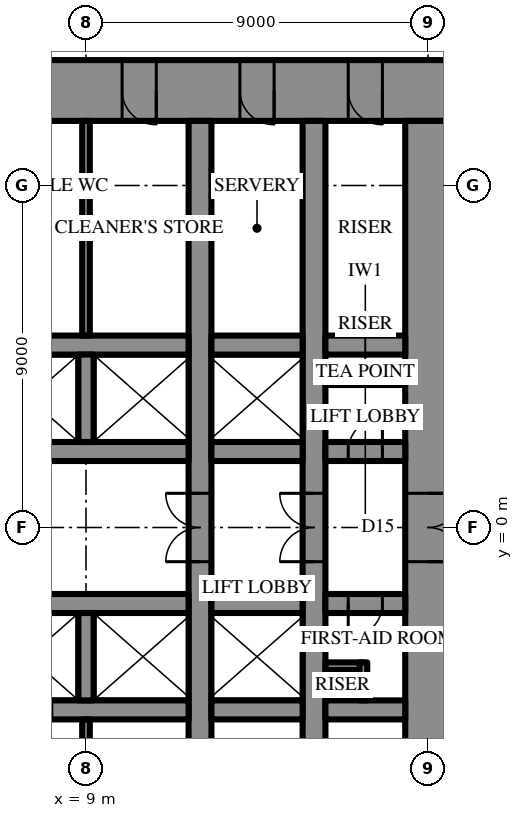
"""IFC4 building model, lengths in metres.
Left out: names, types, materials, properties, quantities, classifications, styles, units other than length and angle.
Written with IfcOpenShell. Run it as: python <this file> out.ifc"""

import sys

from ifc_helpers import new_model, si_unit, direction, frame, frame_2d, origin, place, context, subcontext, project, spatial, rectangle, extrude, element, fill, save


model = new_model("IFC4")
c1 = context("Model", 3, precision=1e-05, world=origin(), true_north=direction((0.0, 1.0)))
c2 = subcontext(c1, "Body", "Model", "MODEL_VIEW")
j1 = project(units=[si_unit("LENGTHUNIT", "METRE"), si_unit("PLANEANGLEUNIT", "RADIAN")], contexts=[c1])
p1 = place(None, origin())
s1 = spatial("IfcSite", under=j1, at=p1, CompositionType="ELEMENT")
p2 = place(p1, origin())
s2 = spatial("IfcBuilding", under=s1, at=p2, CompositionType="ELEMENT")
p3 = place(p2, frame((0.0, 0.0, 148.9)))
s3 = spatial("IfcBuildingStorey", under=s2, at=p3, CompositionType="ELEMENT", Elevation=148.9)
p4 = place(p3, frame((-18.6, 11.5, 0.0), z_axis=(0.0, 0.0, 1.0), x_axis=(1.0, 0.0, 0.0)))
e1 = element("IfcWall", 1, at=p4, inside=s3, PredefinedType="SHEAR", context=c2, shape_type="SweptSolid", body=[
    extrude(rectangle(XDim=37.2, YDim=1.6, at=frame_2d((18.6, 0.0))), origin(), (0.0, 0.0, 1.0), 4.2),
])
p5 = place(p4, frame((19.45, 0.0, 0.0)))
e2 = element("IfcOpeningElement", 2, at=p5, cuts=e1, PredefinedType="OPENING", context=c2, shape_type="SweptSolid", body=[
    extrude(rectangle(XDim=0.9, YDim=2.2, at=frame_2d((0.45, 1.1))), frame((0.0, 0.81, 0.0), z_axis=(0.0, -1.0, 0.0), x_axis=(1.0, 0.0, 0.0)), (0.0, 0.0, 1.0), 1.62),
])
p6 = place(p4, frame((22.45, 0.0, 0.0)))
e3 = element("IfcOpeningElement", 3, at=p6, cuts=e1, PredefinedType="OPENING", context=c2, shape_type="SweptSolid", body=[
    extrude(rectangle(XDim=0.9, YDim=2.2, at=frame_2d((0.45, 1.1))), frame((0.0, 0.81, 0.0), z_axis=(0.0, -1.0, 0.0), x_axis=(1.0, 0.0, 0.0)), (0.0, 0.0, 1.0), 1.62),
])
p7 = place(p4, frame((25.5, 0.0, 0.0)))
e4 = element("IfcOpeningElement", 4, at=p7, cuts=e1, PredefinedType="OPENING", context=c2, shape_type="SweptSolid", body=[
    extrude(rectangle(XDim=1.0, YDim=2.2, at=frame_2d((0.5, 1.1))), frame((0.0, 0.81, 0.0), z_axis=(0.0, -1.0, 0.0), x_axis=(1.0, 0.0, 0.0)), (0.0, 0.0, 1.0), 1.62),
])
p8 = place(p4, frame((1.8, 0.0, 0.0)))
e5 = element("IfcOpeningElement", 5, at=p8, cuts=e1, PredefinedType="OPENING", context=c2, shape_type="SweptSolid", body=[
    extrude(rectangle(XDim=0.9, YDim=2.2, at=frame_2d((0.45, 1.1))), frame((0.0, 0.81, 0.0), z_axis=(0.0, -1.0, 0.0), x_axis=(1.0, 0.0, 0.0)), (0.0, 0.0, 1.0), 1.62),
])
p9 = place(p4, frame((4.65, 0.0, 0.0)))
e6 = element("IfcOpeningElement", 6, at=p9, cuts=e1, PredefinedType="OPENING", context=c2, shape_type="SweptSolid", body=[
    extrude(rectangle(XDim=0.9, YDim=2.2, at=frame_2d((0.45, 1.1))), frame((0.0, 0.81, 0.0), z_axis=(0.0, -1.0, 0.0), x_axis=(1.0, 0.0, 0.0)), (0.0, 0.0, 1.0), 1.62),
])
p10 = place(p4, frame((7.75, 0.0, 0.0)))
e7 = element("IfcOpeningElement", 7, at=p10, cuts=e1, PredefinedType="OPENING", context=c2, shape_type="SweptSolid", body=[
    extrude(rectangle(XDim=0.9, YDim=2.2, at=frame_2d((0.45, 1.1))), frame((0.0, 0.81, 0.0), z_axis=(0.0, -1.0, 0.0), x_axis=(1.0, 0.0, 0.0)), (0.0, 0.0, 1.0), 1.62),
])
p11 = place(p4, frame((28.55, 0.0, 0.0)))
e8 = element("IfcOpeningElement", 8, at=p11, cuts=e1, PredefinedType="OPENING", context=c2, shape_type="SweptSolid", body=[
    extrude(rectangle(XDim=0.9, YDim=2.2, at=frame_2d((0.45, 1.1))), frame((0.0, 0.81, 0.0), z_axis=(0.0, -1.0, 0.0), x_axis=(1.0, 0.0, 0.0)), (0.0, 0.0, 1.0), 1.62),
])
p12 = place(p4, frame((31.65, 0.0, 0.0)))
e9 = element("IfcOpeningElement", 9, at=p12, cuts=e1, PredefinedType="OPENING", context=c2, shape_type="SweptSolid", body=[
    extrude(rectangle(XDim=0.9, YDim=2.2, at=frame_2d((0.45, 1.1))), frame((0.0, 0.81, 0.0), z_axis=(0.0, -1.0, 0.0), x_axis=(1.0, 0.0, 0.0)), (0.0, 0.0, 1.0), 1.62),
])
p13 = place(p4, frame((34.5, 0.0, 0.0)))
e10 = element("IfcOpeningElement", 10, at=p13, cuts=e1, PredefinedType="OPENING", context=c2, shape_type="SweptSolid", body=[
    extrude(rectangle(XDim=0.9, YDim=2.2, at=frame_2d((0.45, 1.1))), frame((0.0, 0.81, 0.0), z_axis=(0.0, -1.0, 0.0), x_axis=(1.0, 0.0, 0.0)), (0.0, 0.0, 1.0), 1.62),
])
p14 = place(p3, frame((18.0, -10.7, 0.0), z_axis=(0.0, 0.0, 1.0), x_axis=(0.0, 1.0, 0.0)))
e11 = element("IfcWall", 11, at=p14, inside=s3, PredefinedType="SHEAR", context=c2, shape_type="SweptSolid", body=[
    extrude(rectangle(XDim=21.4, YDim=1.2, at=frame_2d((10.7, 0.0))), origin(), (0.0, 0.0, 1.0), 4.2),
])
p15 = place(p14, frame((9.8, 0.0, 0.0)))
e12 = element("IfcOpeningElement", 12, at=p15, cuts=e11, PredefinedType="OPENING", context=c2, shape_type="SweptSolid", body=[
    extrude(rectangle(XDim=1.8, YDim=2.4, at=frame_2d((0.9, 1.2))), frame((0.0, 0.61, 0.0), z_axis=(0.0, -1.0, 0.0), x_axis=(1.0, 0.0, 0.0)), (0.0, 0.0, 1.0), 1.22),
])
p16 = place(p3, frame((12.0, -10.7, 0.0), z_axis=(0.0, 0.0, 1.0), x_axis=(0.0, 1.0, 0.0)))
e13 = element("IfcWall", 13, at=p16, inside=s3, PredefinedType="SHEAR", context=c2, shape_type="SweptSolid", body=[
    extrude(rectangle(XDim=21.4, YDim=0.6, at=frame_2d((10.7, 0.0))), origin(), (0.0, 0.0, 1.0), 4.2),
])
p17 = place(p16, frame((9.8, 0.0, 0.0)))
e14 = element("IfcOpeningElement", 14, at=p17, cuts=e13, PredefinedType="OPENING", context=c2, shape_type="SweptSolid", body=[
    extrude(rectangle(XDim=1.8, YDim=2.4, at=frame_2d((0.9, 1.2))), frame((0.0, 0.31, 0.0), z_axis=(0.0, -1.0, 0.0), x_axis=(1.0, 0.0, 0.0)), (0.0, 0.0, 1.0), 0.62),
])
p18 = place(p3, frame((15.0, -10.7, 0.0), z_axis=(0.0, 0.0, 1.0), x_axis=(0.0, 1.0, 0.0)))
e15 = element("IfcWall", 15, at=p18, inside=s3, PredefinedType="SHEAR", context=c2, shape_type="SweptSolid", body=[
    extrude(rectangle(XDim=21.4, YDim=0.6, at=frame_2d((10.7, 0.0))), origin(), (0.0, 0.0, 1.0), 4.2),
])
p19 = place(p18, frame((9.8, 0.0, 0.0)))
e16 = element("IfcOpeningElement", 16, at=p19, cuts=e15, PredefinedType="OPENING", context=c2, shape_type="SweptSolid", body=[
    extrude(rectangle(XDim=1.8, YDim=2.4, at=frame_2d((0.9, 1.2))), frame((0.0, 0.31, 0.0), z_axis=(0.0, -1.0, 0.0), x_axis=(1.0, 0.0, 0.0)), (0.0, 0.0, 1.0), 0.62),
])
p20 = place(p3, frame((-3.2, 2.0, 0.0), z_axis=(0.0, 0.0, 1.0), x_axis=(1.0, 0.0, 0.0)))
e17 = element("IfcWall", 17, at=p20, inside=s3, PredefinedType="SHEAR", context=c2, shape_type="SweptSolid", body=[
    extrude(rectangle(XDim=14.9, YDim=0.5, at=frame_2d((7.45, 0.0))), origin(), (0.0, 0.0, 1.0), 4.2),
])
p21 = place(p20, frame((1.15, 0.0, 0.0)))
e18 = element("IfcOpeningElement", 18, at=p21, cuts=e17, PredefinedType="OPENING", context=c2, shape_type="SweptSolid", body=[
    extrude(rectangle(XDim=1.1, YDim=2.2, at=frame_2d((0.55, 1.1))), frame((0.0, 0.26, 0.0), z_axis=(0.0, -1.0, 0.0), x_axis=(1.0, 0.0, 0.0)), (0.0, 0.0, 1.0), 0.52),
])
p22 = place(p20, frame((4.15, 0.0, 0.0)))
e19 = element("IfcOpeningElement", 19, at=p22, cuts=e17, PredefinedType="OPENING", context=c2, shape_type="SweptSolid", body=[
    extrude(rectangle(XDim=1.1, YDim=2.2, at=frame_2d((0.55, 1.1))), frame((0.0, 0.26, 0.0), z_axis=(0.0, -1.0, 0.0), x_axis=(1.0, 0.0, 0.0)), (0.0, 0.0, 1.0), 0.52),
])
p23 = place(p20, frame((7.15, 0.0, 0.0)))
e20 = element("IfcOpeningElement", 20, at=p23, cuts=e17, PredefinedType="OPENING", context=c2, shape_type="SweptSolid", body=[
    extrude(rectangle(XDim=1.1, YDim=2.2, at=frame_2d((0.55, 1.1))), frame((0.0, 0.26, 0.0), z_axis=(0.0, -1.0, 0.0), x_axis=(1.0, 0.0, 0.0)), (0.0, 0.0, 1.0), 0.52),
])
p24 = place(p20, frame((10.15, 0.0, 0.0)))
e21 = element("IfcOpeningElement", 21, at=p24, cuts=e17, PredefinedType="OPENING", context=c2, shape_type="SweptSolid", body=[
    extrude(rectangle(XDim=1.1, YDim=2.2, at=frame_2d((0.55, 1.1))), frame((0.0, 0.26, 0.0), z_axis=(0.0, -1.0, 0.0), x_axis=(1.0, 0.0, 0.0)), (0.0, 0.0, 1.0), 0.52),
])
p25 = place(p3, frame((12.3, 2.0, 0.0), z_axis=(0.0, 0.0, 1.0), x_axis=(1.0, 0.0, 0.0)))
e22 = element("IfcWall", 22, at=p25, inside=s3, PredefinedType="SHEAR", context=c2, shape_type="SweptSolid", body=[
    extrude(rectangle(XDim=2.4, YDim=0.5, at=frame_2d((1.2, 0.0))), origin(), (0.0, 0.0, 1.0), 4.2),
])
p26 = place(p3, frame((15.3, 2.0, 0.0), z_axis=(0.0, 0.0, 1.0), x_axis=(1.0, 0.0, 0.0)))
e23 = element("IfcWall", 23, at=p26, inside=s3, PredefinedType="SHEAR", context=c2, shape_type="SweptSolid", body=[
    extrude(rectangle(XDim=2.1, YDim=0.5, at=frame_2d((1.05, 0.0))), origin(), (0.0, 0.0, 1.0), 4.2),
])
p27 = place(p26, frame((0.6, 0.0, 0.0)))
e24 = element("IfcOpeningElement", 24, at=p27, cuts=e23, PredefinedType="OPENING", context=c2, shape_type="SweptSolid", body=[
    extrude(rectangle(XDim=0.9, YDim=2.2, at=frame_2d((0.45, 1.1))), frame((0.0, 0.26, 0.0), z_axis=(0.0, -1.0, 0.0), x_axis=(1.0, 0.0, 0.0)), (0.0, 0.0, 1.0), 0.52),
])
p28 = place(p3, frame((-11.7, 4.8, 0.0), z_axis=(0.0, 0.0, 1.0), x_axis=(1.0, 0.0, 0.0)))
e25 = element("IfcWall", 25, at=p28, inside=s3, PredefinedType="SHEAR", context=c2, shape_type="SweptSolid", body=[
    extrude(rectangle(XDim=23.4, YDim=0.5, at=frame_2d((11.7, 0.0))), origin(), (0.0, 0.0, 1.0), 4.2),
])
p29 = place(p28, frame((6.6, 0.0, 0.0)))
e26 = element("IfcOpeningElement", 26, at=p29, cuts=e25, PredefinedType="OPENING", context=c2, shape_type="SweptSolid", body=[
    extrude(rectangle(XDim=1.2, YDim=2.2, at=frame_2d((0.6, 1.1))), frame((0.0, 0.26, 0.0), z_axis=(0.0, -1.0, 0.0), x_axis=(1.0, 0.0, 0.0)), (0.0, 0.0, 1.0), 0.52),
])
p30 = place(p28, frame((3.6, 0.0, 0.0)))
e27 = element("IfcOpeningElement", 27, at=p30, cuts=e25, PredefinedType="OPENING", context=c2, shape_type="SweptSolid", body=[
    extrude(rectangle(XDim=1.2, YDim=2.2, at=frame_2d((0.6, 1.1))), frame((0.0, 0.26, 0.0), z_axis=(0.0, -1.0, 0.0), x_axis=(1.0, 0.0, 0.0)), (0.0, 0.0, 1.0), 0.52),
])
p31 = place(p3, frame((12.3, 4.8, 0.0), z_axis=(0.0, 0.0, 1.0), x_axis=(1.0, 0.0, 0.0)))
e28 = element("IfcWall", 28, at=p31, inside=s3, PredefinedType="SHEAR", context=c2, shape_type="SweptSolid", body=[
    extrude(rectangle(XDim=2.4, YDim=0.5, at=frame_2d((1.2, 0.0))), origin(), (0.0, 0.0, 1.0), 4.2),
])
p32 = place(p3, frame((15.3, 4.8, 0.0), z_axis=(0.0, 0.0, 1.0), x_axis=(1.0, 0.0, 0.0)))
e29 = element("IfcWall", 29, at=p32, inside=s3, PredefinedType="SHEAR", context=c2, shape_type="SweptSolid", body=[
    extrude(rectangle(XDim=2.1, YDim=0.5, at=frame_2d((1.05, 0.0))), origin(), (0.0, 0.0, 1.0), 4.2),
])
p33 = place(p3, frame((9.0, 2.25, 0.0), z_axis=(0.0, 0.0, 1.0), x_axis=(0.0, 1.0, 0.0)))
e30 = element("IfcWall", 30, at=p33, inside=s3, PredefinedType="SHEAR", context=c2, shape_type="SweptSolid", body=[
    extrude(rectangle(XDim=2.3, YDim=0.4, at=frame_2d((1.15, 0.0))), origin(), (0.0, 0.0, 1.0), 4.2),
])
p34 = place(p3, frame((17.4, -2.0, 0.0), z_axis=(0.0, 0.0, 1.0), x_axis=(-1.0, 0.0, 0.0)))
e31 = element("IfcWall", 31, at=p34, inside=s3, PredefinedType="SHEAR", context=c2, shape_type="SweptSolid", body=[
    extrude(rectangle(XDim=2.1, YDim=0.5, at=frame_2d((1.05, 0.0))), origin(), (0.0, 0.0, 1.0), 4.2),
])
p35 = place(p34, frame((0.6, 0.0, 0.0)))
e32 = element("IfcOpeningElement", 32, at=p35, cuts=e31, PredefinedType="OPENING", context=c2, shape_type="SweptSolid", body=[
    extrude(rectangle(XDim=0.9, YDim=2.2, at=frame_2d((0.45, 1.1))), frame((0.0, 0.26, 0.0), z_axis=(0.0, -1.0, 0.0), x_axis=(1.0, 0.0, 0.0)), (0.0, 0.0, 1.0), 0.52),
])
p36 = place(p3, frame((14.7, -2.0, 0.0), z_axis=(0.0, 0.0, 1.0), x_axis=(-1.0, 0.0, 0.0)))
e33 = element("IfcWall", 33, at=p36, inside=s3, PredefinedType="SHEAR", context=c2, shape_type="SweptSolid", body=[
    extrude(rectangle(XDim=2.4, YDim=0.5, at=frame_2d((1.2, 0.0))), origin(), (0.0, 0.0, 1.0), 4.2),
])
p37 = place(p3, frame((11.7, -2.0, 0.0), z_axis=(0.0, 0.0, 1.0), x_axis=(-1.0, 0.0, 0.0)))
e34 = element("IfcWall", 34, at=p37, inside=s3, PredefinedType="SHEAR", context=c2, shape_type="SweptSolid", body=[
    extrude(rectangle(XDim=5.9, YDim=0.5, at=frame_2d((2.95, 0.0))), origin(), (0.0, 0.0, 1.0), 4.2),
])
p38 = place(p3, frame((17.4, -4.8, 0.0), z_axis=(0.0, 0.0, 1.0), x_axis=(-1.0, 0.0, 0.0)))
e35 = element("IfcWall", 35, at=p38, inside=s3, PredefinedType="SHEAR", context=c2, shape_type="SweptSolid", body=[
    extrude(rectangle(XDim=2.1, YDim=0.5, at=frame_2d((1.05, 0.0))), origin(), (0.0, 0.0, 1.0), 4.2),
])
p39 = place(p3, frame((14.7, -4.8, 0.0), z_axis=(0.0, 0.0, 1.0), x_axis=(-1.0, 0.0, 0.0)))
e36 = element("IfcWall", 36, at=p39, inside=s3, PredefinedType="SHEAR", context=c2, shape_type="SweptSolid", body=[
    extrude(rectangle(XDim=2.4, YDim=0.5, at=frame_2d((1.2, 0.0))), origin(), (0.0, 0.0, 1.0), 4.2),
])
p40 = place(p3, frame((11.7, -4.8, 0.0), z_axis=(0.0, 0.0, 1.0), x_axis=(-1.0, 0.0, 0.0)))
e37 = element("IfcWall", 37, at=p40, inside=s3, PredefinedType="SHEAR", context=c2, shape_type="SweptSolid", body=[
    extrude(rectangle(XDim=23.4, YDim=0.5, at=frame_2d((11.7, 0.0))), origin(), (0.0, 0.0, 1.0), 4.2),
])
p41 = place(p40, frame((6.6, 0.0, 0.0)))
e38 = element("IfcOpeningElement", 38, at=p41, cuts=e37, PredefinedType="OPENING", context=c2, shape_type="SweptSolid", body=[
    extrude(rectangle(XDim=1.2, YDim=2.2, at=frame_2d((0.6, 1.1))), frame((0.0, 0.26, 0.0), z_axis=(0.0, -1.0, 0.0), x_axis=(1.0, 0.0, 0.0)), (0.0, 0.0, 1.0), 0.52),
])
p42 = place(p40, frame((3.6, 0.0, 0.0)))
e39 = element("IfcOpeningElement", 39, at=p42, cuts=e37, PredefinedType="OPENING", context=c2, shape_type="SweptSolid", body=[
    extrude(rectangle(XDim=1.2, YDim=2.2, at=frame_2d((0.6, 1.1))), frame((0.0, 0.26, 0.0), z_axis=(0.0, -1.0, 0.0), x_axis=(1.0, 0.0, 0.0)), (0.0, 0.0, 1.0), 0.52),
])
p43 = place(p3, frame((9.0, -2.25, 0.0), z_axis=(0.0, 0.0, 1.0), x_axis=(0.0, -1.0, 0.0)))
e40 = element("IfcWall", 40, at=p43, inside=s3, PredefinedType="SHEAR", context=c2, shape_type="SweptSolid", body=[
    extrude(rectangle(XDim=2.3, YDim=0.4, at=frame_2d((1.15, 0.0))), origin(), (0.0, 0.0, 1.0), 4.2),
])
for number, where, z_axis, x_axis in (
    (41, (9.0, 5.05, 0.0), (0.0, 0.0, 1.0), (0.0, 1.0, 0.0)),
    (42, (9.0, -5.05, 0.0), (0.0, 0.0, 1.0), (0.0, -1.0, 0.0)),
):
    element("IfcWall", number, at=place(p3, frame(where, z_axis=z_axis, x_axis=x_axis)), inside=s3, PredefinedType="PARTITIONING", context=c2, shape_type="SweptSolid", body=[
        extrude(rectangle(XDim=5.65, YDim=0.2, at=frame_2d((2.825, 0.0))), origin(), (0.0, 0.0, 1.0), 4.0),
    ])
p44 = place(p3, frame((15.3, 3.85, 0.0), z_axis=(0.0, 0.0, 1.0), x_axis=(1.0, 0.0, 0.0)))
e43 = element("IfcWall", 43, at=p44, inside=s3, PredefinedType="PARTITIONING", context=c2, shape_type="SweptSolid", body=[
    extrude(rectangle(XDim=2.1, YDim=0.2, at=frame_2d((1.05, 0.0))), origin(), (0.0, 0.0, 1.0), 4.0),
])
for number, where, z_axis, x_axis in (
    (44, (16.3, -3.65, 0.0), (0.0, 0.0, 1.0), (-1.0, 0.0, 0.0)),
    (45, (16.3, -3.55, 0.0), (0.0, 0.0, 1.0), (0.0, -1.0, 0.0)),
):
    element("IfcWall", number, at=place(p3, frame(where, z_axis=z_axis, x_axis=x_axis)), inside=s3, PredefinedType="PARTITIONING", context=c2, shape_type="SweptSolid", body=[
        extrude(rectangle(XDim=1.0, YDim=0.2, at=frame_2d((0.5, 0.0))), origin(), (0.0, 0.0, 1.0), 4.0),
    ])
p45 = place(p15, frame((1.8, 0.0, 0.0), z_axis=(0.0, 0.0, 1.0), x_axis=(-1.0, 0.0, 0.0)))
e46 = element("IfcDoor", 46, at=p45, inside=s3, OperationType="DOUBLE_DOOR_SINGLE_SWING", PredefinedType="DOOR", context=c2, shape_type="SweptSolid", body=[
    extrude(rectangle(XDim=1.8, YDim=2.4, at=frame_2d((0.9, 1.2))), frame((0.0, 0.025, 0.0), z_axis=(0.0, -1.0, 0.0), x_axis=(1.0, 0.0, 0.0)), (0.0, 0.0, 1.0), 0.05),
])
fill(e12, e46)
p46 = place(p11, frame((0.9, 0.0, 0.0), z_axis=(0.0, 0.0, 1.0), x_axis=(-1.0, 0.0, 0.0)))
e47 = element("IfcDoor", 47, at=p46, inside=s3, OperationType="SINGLE_SWING_RIGHT", PredefinedType="DOOR", context=c2, shape_type="SweptSolid", body=[
    extrude(rectangle(XDim=0.9, YDim=2.2, at=frame_2d((0.45, 1.1))), frame((0.0, 0.025, 0.0), z_axis=(0.0, -1.0, 0.0), x_axis=(1.0, 0.0, 0.0)), (0.0, 0.0, 1.0), 0.05),
])
fill(e8, e47)
p47 = place(p12, frame((0.9, 0.0, 0.0), z_axis=(0.0, 0.0, 1.0), x_axis=(-1.0, 0.0, 0.0)))
e48 = element("IfcDoor", 48, at=p47, inside=s3, OperationType="SINGLE_SWING_RIGHT", PredefinedType="DOOR", context=c2, shape_type="SweptSolid", body=[
    extrude(rectangle(XDim=0.9, YDim=2.2, at=frame_2d((0.45, 1.1))), frame((0.0, 0.025, 0.0), z_axis=(0.0, -1.0, 0.0), x_axis=(1.0, 0.0, 0.0)), (0.0, 0.0, 1.0), 0.05),
])
fill(e9, e48)
p48 = place(p13, frame((0.9, 0.0, 0.0), z_axis=(0.0, 0.0, 1.0), x_axis=(-1.0, 0.0, 0.0)))
e49 = element("IfcDoor", 49, at=p48, inside=s3, OperationType="SINGLE_SWING_RIGHT", PredefinedType="DOOR", context=c2, shape_type="SweptSolid", body=[
    extrude(rectangle(XDim=0.9, YDim=2.2, at=frame_2d((0.45, 1.1))), frame((0.0, 0.025, 0.0), z_axis=(0.0, -1.0, 0.0), x_axis=(1.0, 0.0, 0.0)), (0.0, 0.0, 1.0), 0.05),
])
fill(e10, e49)
p49 = place(p27, origin())
e50 = element("IfcDoor", 50, at=p49, inside=s3, OperationType="SINGLE_SWING_LEFT", PredefinedType="DOOR", context=c2, shape_type="SweptSolid", body=[
    extrude(rectangle(XDim=0.9, YDim=2.2, at=frame_2d((0.45, 1.1))), frame((0.0, 0.025, 0.0), z_axis=(0.0, -1.0, 0.0), x_axis=(1.0, 0.0, 0.0)), (0.0, 0.0, 1.0), 0.05),
])
fill(e24, e50)
p50 = place(p35, origin())
e51 = element("IfcDoor", 51, at=p50, inside=s3, OperationType="SINGLE_SWING_LEFT", PredefinedType="DOOR", context=c2, shape_type="SweptSolid", body=[
    extrude(rectangle(XDim=0.9, YDim=2.2, at=frame_2d((0.45, 1.1))), frame((0.0, 0.025, 0.0), z_axis=(0.0, -1.0, 0.0), x_axis=(1.0, 0.0, 0.0)), (0.0, 0.0, 1.0), 0.05),
])
fill(e32, e51)
p51 = place(p17, origin())
e52 = element("IfcDoor", 52, at=p51, inside=s3, OperationType="DOUBLE_DOOR_SINGLE_SWING", PredefinedType="DOOR", context=c2, shape_type="SweptSolid", body=[
    extrude(rectangle(XDim=1.8, YDim=2.4, at=frame_2d((0.9, 1.2))), frame((0.0, 0.025, 0.0), z_axis=(0.0, -1.0, 0.0), x_axis=(1.0, 0.0, 0.0)), (0.0, 0.0, 1.0), 0.05),
])
fill(e14, e52)
p52 = place(p19, origin())
e53 = element("IfcDoor", 53, at=p52, inside=s3, OperationType="DOUBLE_DOOR_SINGLE_SWING", PredefinedType="DOOR", context=c2, shape_type="SweptSolid", body=[
    extrude(rectangle(XDim=1.8, YDim=2.4, at=frame_2d((0.9, 1.2))), frame((0.0, 0.025, 0.0), z_axis=(0.0, -1.0, 0.0), x_axis=(1.0, 0.0, 0.0)), (0.0, 0.0, 1.0), 0.05),
])
fill(e16, e53)
save(model, sys.argv[1])
